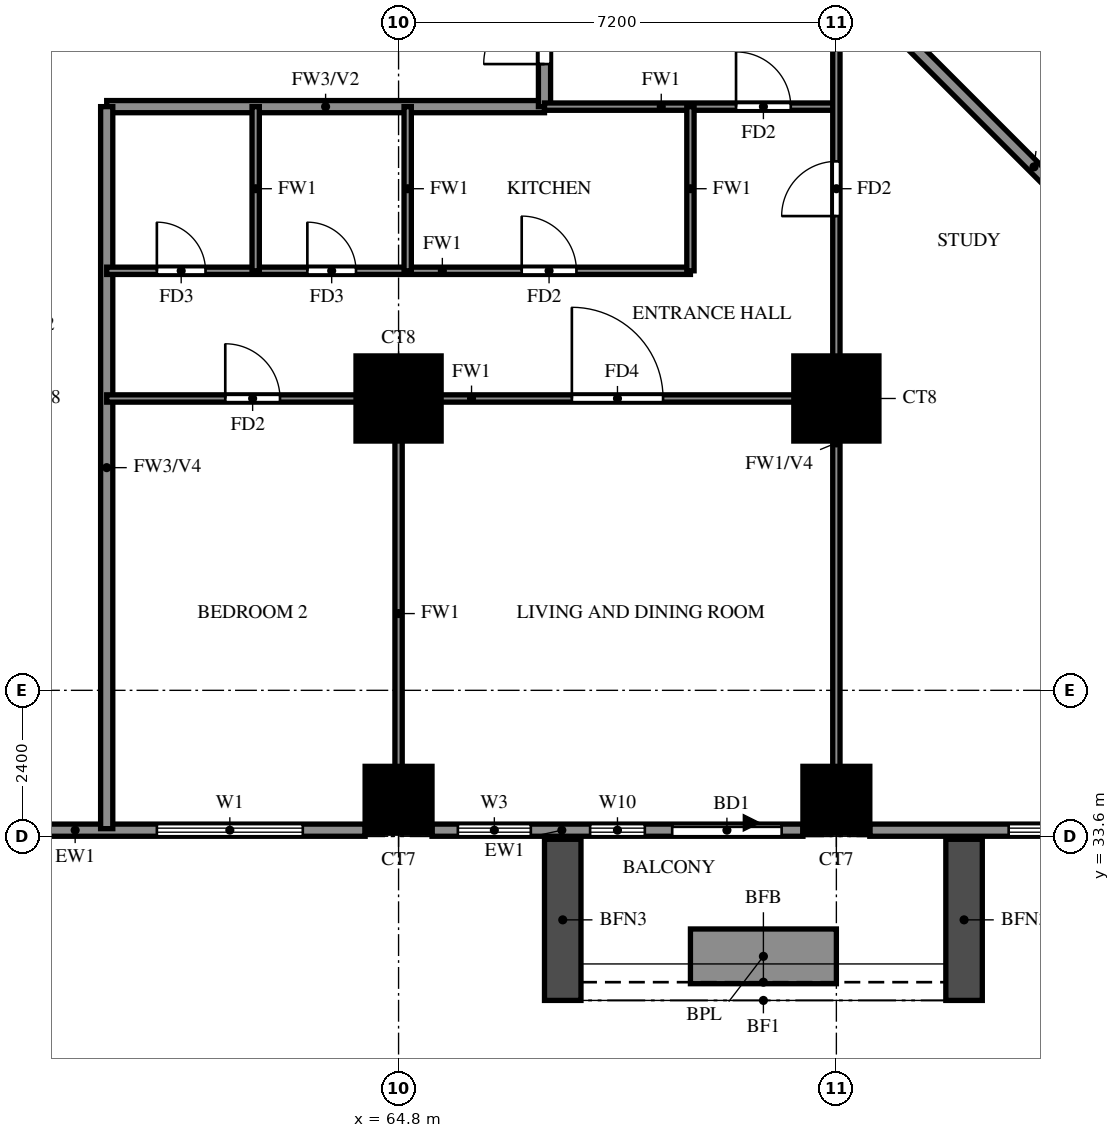
"""IFC4 building model, lengths in metres.
Left out: names, types, materials, properties, quantities, classifications, styles, units other than length and angle.
Written with IfcOpenShell. Run it as: python <this file> out.ifc"""

import sys

from ifc_helpers import new_model, si_unit, direction, frame, frame_2d, origin, origin_2d, place, context, subcontext, project, spatial, rectangle, extrude, source, transform, mapped, element, fill, save


model = new_model("IFC4")
c1 = context("Model", 3, precision=1e-05, world=origin(), true_north=direction((0.0, 1.0)))
c2 = subcontext(c1, "Body", "Model", "MODEL_VIEW")
j1 = project(units=[si_unit("LENGTHUNIT", "METRE"), si_unit("PLANEANGLEUNIT", "RADIAN")], contexts=[c1])
p1 = place(None, origin())
s1 = spatial("IfcSite", under=j1, at=p1, CompositionType="ELEMENT")
p2 = place(p1, origin())
s2 = spatial("IfcBuilding", under=s1, at=p2, CompositionType="ELEMENT")
p3 = place(p2, frame((0.0, 0.0, 48.0)))
s3 = spatial("IfcBuildingStorey", under=s2, at=p3, CompositionType="ELEMENT", Elevation=48.0)
m1 = source(origin(), c2, "Body", "SweptSolid", [
    extrude(rectangle(XDim=1.1, YDim=1.1, at=origin_2d()), origin(), (0.0, 0.0, 1.0), 3.18),
])
for number, where, z_axis, x_axis in (
    (1, (64.8, 34.2, 0.0), (0.0, 0.0, 1.0), (1.0, 0.0, 0.0)),
    (2, (72.0, 34.2, 0.0), (0.0, 0.0, 1.0), (1.0, 0.0, 0.0)),
):
    element("IfcColumn", number, at=place(p3, frame(where, z_axis=z_axis, x_axis=x_axis)), inside=s3, PredefinedType="COLUMN", context=c2, shape_type="MappedRepresentation", body=[
        mapped(m1, transform((0.0, 0.0, 0.0))),
    ])
m2 = source(origin(), c2, "Body", "SweptSolid", [
    extrude(rectangle(XDim=1.4, YDim=1.4, at=origin_2d()), origin(), (0.0, 0.0, 1.0), 3.18),
])
for number, where, z_axis, x_axis in (
    (3, (64.8, 40.8, 0.0), (0.0, 0.0, 1.0), (1.0, 0.0, 0.0)),
    (4, (72.0, 40.8, 0.0), (0.0, 0.0, 1.0), (1.0, 0.0, 0.0)),
):
    element("IfcColumn", number, at=place(p3, frame(where, z_axis=z_axis, x_axis=x_axis)), inside=s3, PredefinedType="COLUMN", context=c2, shape_type="MappedRepresentation", body=[
        mapped(m2, transform((0.0, 0.0, 0.0))),
    ])
p4 = place(p3, frame((78.74, 41.118, 0.0), z_axis=(0.0, 0.0, 1.0), x_axis=(-0.707106781187, 0.707106781187, 0.0)))
e5 = element("IfcWall", 5, at=p4, inside=s3, PredefinedType="SOLIDWALL", context=c2, shape_type="SweptSolid", body=[
    extrude(rectangle(XDim=9.874, YDim=0.2, at=frame_2d((4.937, 0.0))), origin(), (0.0, 0.0, 1.0), 3.18),
])
p5 = place(p3, frame((58.8, 33.7, 0.0), z_axis=(0.0, 0.0, 1.0), x_axis=(1.0, 0.0, 0.0)))
e6 = element("IfcWall", 6, at=p5, inside=s3, PredefinedType="SOLIDWALL", context=c2, shape_type="SweptSolid", body=[
    extrude(rectangle(XDim=5.45, YDim=0.2, at=frame_2d((2.725, 0.0))), origin(), (0.0, 0.0, 1.0), 3.18),
])
p6 = place(p5, frame((2.025, 0.0, 0.6)))
e7 = element("IfcOpeningElement", 7, at=p6, cuts=e6, PredefinedType="OPENING", context=c2, shape_type="SweptSolid", body=[
    extrude(rectangle(XDim=2.4, YDim=2.4, at=frame_2d((1.2, 1.2))), frame((0.0, 0.11, 0.0), z_axis=(0.0, -1.0, 0.0), x_axis=(1.0, 0.0, 0.0)), (0.0, 0.0, 1.0), 0.22),
])
p7 = place(p3, frame((65.35, 33.7, 0.0), z_axis=(0.0, 0.0, 1.0), x_axis=(1.0, 0.0, 0.0)))
e8 = element("IfcWall", 8, at=p7, inside=s3, PredefinedType="SOLIDWALL", context=c2, shape_type="SweptSolid", body=[
    extrude(rectangle(XDim=6.1, YDim=0.2, at=frame_2d((3.05, 0.0))), origin(), (0.0, 0.0, 1.0), 3.18),
])
p8 = place(p7, frame((3.95, 0.0, 0.0)))
e9 = element("IfcOpeningElement", 9, at=p8, cuts=e8, PredefinedType="OPENING", context=c2, shape_type="SweptSolid", body=[
    extrude(rectangle(XDim=1.8, YDim=2.4, at=frame_2d((0.9, 1.2))), frame((0.0, 0.11, 0.0), z_axis=(0.0, -1.0, 0.0), x_axis=(1.0, 0.0, 0.0)), (0.0, 0.0, 1.0), 0.22),
])
p9 = place(p7, frame((0.425, 0.0, 0.6)))
e10 = element("IfcOpeningElement", 10, at=p9, cuts=e8, PredefinedType="OPENING", context=c2, shape_type="SweptSolid", body=[
    extrude(rectangle(XDim=1.2, YDim=2.4, at=frame_2d((0.6, 1.2))), frame((0.0, 0.11, 0.0), z_axis=(0.0, -1.0, 0.0), x_axis=(1.0, 0.0, 0.0)), (0.0, 0.0, 1.0), 0.22),
])
p10 = place(p7, frame((2.6, 0.0, 0.6)))
e11 = element("IfcOpeningElement", 11, at=p10, cuts=e8, PredefinedType="OPENING", context=c2, shape_type="SweptSolid", body=[
    extrude(rectangle(XDim=0.9, YDim=2.4, at=frame_2d((0.45, 1.2))), frame((0.0, 0.11, 0.0), z_axis=(0.0, -1.0, 0.0), x_axis=(1.0, 0.0, 0.0)), (0.0, 0.0, 1.0), 0.22),
])
p11 = place(p3, frame((72.55, 33.7, 0.0), z_axis=(0.0, 0.0, 1.0), x_axis=(1.0, 0.0, 0.0)))
e12 = element("IfcWall", 12, at=p11, inside=s3, PredefinedType="SOLIDWALL", context=c2, shape_type="SweptSolid", body=[
    extrude(rectangle(XDim=13.609, YDim=0.2, at=frame_2d((6.804, 0.0))), origin(), (0.0, 0.0, 1.0), 3.18),
])
p12 = place(p11, frame((2.283, 0.0, 0.6)))
e13 = element("IfcOpeningElement", 13, at=p12, cuts=e12, PredefinedType="OPENING", context=c2, shape_type="SweptSolid", body=[
    extrude(rectangle(XDim=2.4, YDim=2.4, at=frame_2d((1.2, 1.2))), frame((0.0, 0.11, 0.0), z_axis=(0.0, -1.0, 0.0), x_axis=(1.0, 0.0, 0.0)), (0.0, 0.0, 1.0), 0.22),
])
p13 = place(p11, frame((5.017, 0.0, 0.6)))
e14 = element("IfcOpeningElement", 14, at=p13, cuts=e12, PredefinedType="OPENING", context=c2, shape_type="SweptSolid", body=[
    extrude(rectangle(XDim=2.4, YDim=2.4, at=frame_2d((1.2, 1.2))), frame((0.0, 0.11, 0.0), z_axis=(0.0, -1.0, 0.0), x_axis=(1.0, 0.0, 0.0)), (0.0, 0.0, 1.0), 0.22),
])
p14 = place(p11, frame((9.429, 0.0, 0.6)))
e15 = element("IfcOpeningElement", 15, at=p14, cuts=e12, PredefinedType="OPENING", context=c2, shape_type="SweptSolid", body=[
    extrude(rectangle(XDim=2.4, YDim=2.4, at=frame_2d((1.2, 1.2))), frame((0.0, 0.11, 0.0), z_axis=(0.0, -1.0, 0.0), x_axis=(1.0, 0.0, 0.0)), (0.0, 0.0, 1.0), 0.22),
])
for number, where, z_axis, x_axis in (
    (16, (67.5, 33.55, 0.0), (0.0, 0.0, 1.0), (0.0, -1.0, 0.0)),
    (17, (74.1, 33.55, 0.0), (0.0, 0.0, 1.0), (0.0, -1.0, 0.0)),
):
    element("IfcWall", number, at=place(p3, frame(where, z_axis=z_axis, x_axis=x_axis)), inside=s3, PredefinedType="SOLIDWALL", context=c2, shape_type="SweptSolid", body=[
        extrude(rectangle(XDim=2.65, YDim=0.6, at=frame_2d((1.325, 0.0))), origin(), (0.0, 0.0, 1.0), 2.85),
    ])
p15 = place(p3, frame((69.6, 31.625, 0.0), z_axis=(0.0, 0.0, 1.0), x_axis=(1.0, 0.0, 0.0)))
e18 = element("IfcWall", 18, at=p15, inside=s3, PredefinedType="SOLIDWALL", context=c2, shape_type="SweptSolid", body=[
    extrude(rectangle(XDim=2.4, YDim=0.9, at=frame_2d((1.2, 0.0))), origin(), (0.0, 0.0, 1.0), 0.9),
])
p16 = place(p3, frame((60.0, 45.6, 0.0), z_axis=(0.0, 0.0, 1.0), x_axis=(1.0, 0.0, 0.0)))
e19 = element("IfcWall", 19, at=p16, inside=s3, PredefinedType="SOLIDWALL", context=c2, shape_type="SweptSolid", body=[
    extrude(rectangle(XDim=7.2, YDim=0.2, at=frame_2d((3.6, 0.0))), origin(), (0.0, 0.0, 1.0), 3.18),
])
p17 = place(p3, frame((60.0, 33.725, 0.0), z_axis=(0.0, 0.0, 1.0), x_axis=(0.0, 1.0, 0.0)))
e20 = element("IfcWall", 20, at=p17, inside=s3, PredefinedType="SOLIDWALL", context=c2, shape_type="SweptSolid", body=[
    extrude(rectangle(XDim=11.875, YDim=0.2, at=frame_2d((5.938, 0.0))), origin(), (0.0, 0.0, 1.0), 2.28),
])
p18 = place(p3, frame((67.2, 45.6, 0.0), z_axis=(0.0, 0.0, 1.0), x_axis=(0.0, 1.0, 0.0)))
e21 = element("IfcWall", 21, at=p18, inside=s3, PredefinedType="SOLIDWALL", context=c2, shape_type="SweptSolid", body=[
    extrude(rectangle(XDim=12.0, YDim=0.2, at=frame_2d((6.0, 0.0))), origin(), (0.0, 0.0, 1.0), 3.18),
])
p19 = place(p18, frame((10.3, 0.0, 0.0)))
e22 = element("IfcOpeningElement", 22, at=p19, cuts=e21, PredefinedType="OPENING", context=c2, shape_type="SweptSolid", body=[
    extrude(rectangle(XDim=1.0, YDim=2.1, at=frame_2d((0.5, 1.05))), frame((0.0, 0.11, 0.0), z_axis=(0.0, -1.0, 0.0), x_axis=(1.0, 0.0, 0.0)), (0.0, 0.0, 1.0), 0.22),
])
p20 = place(p18, frame((0.7, 0.0, 0.0)))
e23 = element("IfcOpeningElement", 23, at=p20, cuts=e21, PredefinedType="OPENING", context=c2, shape_type="SweptSolid", body=[
    extrude(rectangle(XDim=1.0, YDim=2.1, at=frame_2d((0.5, 1.05))), frame((0.0, 0.11, 0.0), z_axis=(0.0, -1.0, 0.0), x_axis=(1.0, 0.0, 0.0)), (0.0, 0.0, 1.0), 0.22),
])
p21 = place(p3, frame((60.0, 40.8, 0.0), z_axis=(0.0, 0.0, 1.0), x_axis=(1.0, 0.0, 0.0)))
e24 = element("IfcWall", 24, at=p21, inside=s3, PredefinedType="PARTITIONING", context=c2, shape_type="SweptSolid", body=[
    extrude(rectangle(XDim=12.0, YDim=0.12, at=frame_2d((6.0, 0.0))), origin(), (0.0, 0.0, 1.0), 3.18),
])
p22 = place(p21, frame((7.65, 0.0, 0.0)))
e25 = element("IfcOpeningElement", 25, at=p22, cuts=e24, PredefinedType="OPENING", context=c2, shape_type="SweptSolid", body=[
    extrude(rectangle(XDim=1.5, YDim=2.1, at=frame_2d((0.75, 1.05))), frame((0.0, 0.07, 0.0), z_axis=(0.0, -1.0, 0.0), x_axis=(1.0, 0.0, 0.0)), (0.0, 0.0, 1.0), 0.14),
])
p23 = place(p21, frame((1.95, 0.0, 0.0)))
e26 = element("IfcOpeningElement", 26, at=p23, cuts=e24, PredefinedType="OPENING", context=c2, shape_type="SweptSolid", body=[
    extrude(rectangle(XDim=0.9, YDim=2.1, at=frame_2d((0.45, 1.05))), frame((0.0, 0.07, 0.0), z_axis=(0.0, -1.0, 0.0), x_axis=(1.0, 0.0, 0.0)), (0.0, 0.0, 1.0), 0.14),
])
p24 = place(p3, frame((60.0, 42.9, 0.0), z_axis=(0.0, 0.0, 1.0), x_axis=(1.0, 0.0, 0.0)))
e27 = element("IfcWall", 27, at=p24, inside=s3, PredefinedType="PARTITIONING", context=c2, shape_type="SweptSolid", body=[
    extrude(rectangle(XDim=9.6, YDim=0.12, at=frame_2d((4.8, 0.0))), origin(), (0.0, 0.0, 1.0), 3.18),
])
p25 = place(p24, frame((6.825, 0.0, 0.0)))
e28 = element("IfcOpeningElement", 28, at=p25, cuts=e27, PredefinedType="OPENING", context=c2, shape_type="SweptSolid", body=[
    extrude(rectangle(XDim=0.9, YDim=2.1, at=frame_2d((0.45, 1.05))), frame((0.0, 0.07, 0.0), z_axis=(0.0, -1.0, 0.0), x_axis=(1.0, 0.0, 0.0)), (0.0, 0.0, 1.0), 0.14),
])
p26 = place(p24, frame((3.3, 0.0, 0.0)))
e29 = element("IfcOpeningElement", 29, at=p26, cuts=e27, PredefinedType="OPENING", context=c2, shape_type="SweptSolid", body=[
    extrude(rectangle(XDim=0.8, YDim=2.1, at=frame_2d((0.4, 1.05))), frame((0.0, 0.07, 0.0), z_axis=(0.0, -1.0, 0.0), x_axis=(1.0, 0.0, 0.0)), (0.0, 0.0, 1.0), 0.14),
])
p27 = place(p24, frame((0.825, 0.0, 0.0)))
e30 = element("IfcOpeningElement", 30, at=p27, cuts=e27, PredefinedType="OPENING", context=c2, shape_type="SweptSolid", body=[
    extrude(rectangle(XDim=0.8, YDim=2.1, at=frame_2d((0.4, 1.05))), frame((0.0, 0.07, 0.0), z_axis=(0.0, -1.0, 0.0), x_axis=(1.0, 0.0, 0.0)), (0.0, 0.0, 1.0), 0.14),
])
p28 = place(p3, frame((67.2, 45.6, 0.0), z_axis=(0.0, 0.0, 1.0), x_axis=(1.0, 0.0, 0.0)))
e31 = element("IfcWall", 31, at=p28, inside=s3, PredefinedType="PARTITIONING", context=c2, shape_type="SweptSolid", body=[
    extrude(rectangle(XDim=4.8, YDim=0.12, at=frame_2d((2.4, 0.0))), origin(), (0.0, 0.0, 1.0), 3.18),
])
p29 = place(p28, frame((3.15, 0.0, 0.0)))
e32 = element("IfcOpeningElement", 32, at=p29, cuts=e31, PredefinedType="OPENING", context=c2, shape_type="SweptSolid", body=[
    extrude(rectangle(XDim=0.9, YDim=2.1, at=frame_2d((0.45, 1.05))), frame((0.0, 0.07, 0.0), z_axis=(0.0, -1.0, 0.0), x_axis=(1.0, 0.0, 0.0)), (0.0, 0.0, 1.0), 0.14),
])
p30 = place(p3, frame((62.45, 42.9, 0.0), z_axis=(0.0, 0.0, 1.0), x_axis=(0.0, 1.0, 0.0)))
e33 = element("IfcWall", 33, at=p30, inside=s3, PredefinedType="PARTITIONING", context=c2, shape_type="SweptSolid", body=[
    extrude(rectangle(XDim=2.7, YDim=0.12, at=frame_2d((1.35, 0.0))), origin(), (0.0, 0.0, 1.0), 3.18),
])
p31 = place(p3, frame((64.8, 33.725, 0.0), z_axis=(0.0, 0.0, 1.0), x_axis=(0.0, 1.0, 0.0)))
e34 = element("IfcWall", 34, at=p31, inside=s3, PredefinedType="PARTITIONING", context=c2, shape_type="SweptSolid", body=[
    extrude(rectangle(XDim=7.075, YDim=0.12, at=frame_2d((3.538, 0.0))), origin(), (0.0, 0.0, 1.0), 3.18),
])
for number, where, z_axis, x_axis in (
    (35, (64.95, 42.9, 0.0), (0.0, 0.0, 1.0), (0.0, 1.0, 0.0)),
    (36, (69.6, 42.9, 0.0), (0.0, 0.0, 1.0), (0.0, 1.0, 0.0)),
):
    element("IfcWall", number, at=place(p3, frame(where, z_axis=z_axis, x_axis=x_axis)), inside=s3, PredefinedType="PARTITIONING", context=c2, shape_type="SweptSolid", body=[
        extrude(rectangle(XDim=2.7, YDim=0.12, at=frame_2d((1.35, 0.0))), origin(), (0.0, 0.0, 1.0), 3.18),
    ])
p32 = place(p3, frame((72.0, 33.725, 0.0), z_axis=(0.0, 0.0, 1.0), x_axis=(0.0, 1.0, 0.0)))
e37 = element("IfcWall", 37, at=p32, inside=s3, PredefinedType="PARTITIONING", context=c2, shape_type="SweptSolid", body=[
    extrude(rectangle(XDim=14.098, YDim=0.12, at=frame_2d((7.049, 0.0))), origin(), (0.0, 0.0, 1.0), 2.28),
])
p33 = place(p32, frame((10.075, 0.0, 0.0)))
e38 = element("IfcOpeningElement", 38, at=p33, cuts=e37, PredefinedType="OPENING", context=c2, shape_type="SweptSolid", body=[
    extrude(rectangle(XDim=0.9, YDim=2.1, at=frame_2d((0.45, 1.05))), frame((0.0, 0.07, 0.0), z_axis=(0.0, -1.0, 0.0), x_axis=(1.0, 0.0, 0.0)), (0.0, 0.0, 1.0), 0.14),
])
p34 = place(p6, origin())
e39 = element("IfcWindow", 39, at=p34, inside=s3, PartitioningType="DOUBLE_PANEL_VERTICAL", PredefinedType="WINDOW", context=c2, shape_type="SweptSolid", body=[
    extrude(rectangle(XDim=2.4, YDim=2.4, at=frame_2d((1.2, 1.2))), frame((0.0, 0.03, 0.0), z_axis=(0.0, -1.0, 0.0), x_axis=(1.0, 0.0, 0.0)), (0.0, 0.0, 1.0), 0.06),
])
fill(e7, e39)
p35 = place(p8, origin())
e40 = element("IfcDoor", 40, at=p35, inside=s3, OperationType="DOUBLE_DOOR_SLIDING", PredefinedType="DOOR", context=c2, shape_type="SweptSolid", body=[
    extrude(rectangle(XDim=1.8, YDim=2.4, at=frame_2d((0.9, 1.2))), frame((0.0, 0.025, 0.0), z_axis=(0.0, -1.0, 0.0), x_axis=(1.0, 0.0, 0.0)), (0.0, 0.0, 1.0), 0.05),
])
fill(e9, e40)
p36 = place(p9, origin())
e41 = element("IfcWindow", 41, at=p36, inside=s3, PartitioningType="SINGLE_PANEL", PredefinedType="WINDOW", context=c2, shape_type="SweptSolid", body=[
    extrude(rectangle(XDim=1.2, YDim=2.4, at=frame_2d((0.6, 1.2))), frame((0.0, 0.03, 0.0), z_axis=(0.0, -1.0, 0.0), x_axis=(1.0, 0.0, 0.0)), (0.0, 0.0, 1.0), 0.06),
])
fill(e10, e41)
p37 = place(p10, origin())
e42 = element("IfcWindow", 42, at=p37, inside=s3, PartitioningType="SINGLE_PANEL", PredefinedType="WINDOW", context=c2, shape_type="SweptSolid", body=[
    extrude(rectangle(XDim=0.9, YDim=2.4, at=frame_2d((0.45, 1.2))), frame((0.0, 0.03, 0.0), z_axis=(0.0, -1.0, 0.0), x_axis=(1.0, 0.0, 0.0)), (0.0, 0.0, 1.0), 0.06),
])
fill(e11, e42)
p38 = place(p12, origin())
e43 = element("IfcWindow", 43, at=p38, inside=s3, PartitioningType="DOUBLE_PANEL_VERTICAL", PredefinedType="WINDOW", context=c2, shape_type="SweptSolid", body=[
    extrude(rectangle(XDim=2.4, YDim=2.4, at=frame_2d((1.2, 1.2))), frame((0.0, 0.03, 0.0), z_axis=(0.0, -1.0, 0.0), x_axis=(1.0, 0.0, 0.0)), (0.0, 0.0, 1.0), 0.06),
])
fill(e13, e43)
p39 = place(p29, origin())
e44 = element("IfcDoor", 44, at=p39, inside=s3, OperationType="SINGLE_SWING_LEFT", PredefinedType="DOOR", context=c2, shape_type="SweptSolid", body=[
    extrude(rectangle(XDim=0.9, YDim=2.1, at=frame_2d((0.45, 1.05))), frame((0.0, 0.025, 0.0), z_axis=(0.0, -1.0, 0.0), x_axis=(1.0, 0.0, 0.0)), (0.0, 0.0, 1.0), 0.05),
])
fill(e32, e44)
p40 = place(p20, origin())
e45 = element("IfcDoor", 45, at=p40, inside=s3, OperationType="SINGLE_SWING_LEFT", PredefinedType="DOOR", context=c2, shape_type="SweptSolid", body=[
    extrude(rectangle(XDim=1.0, YDim=2.1, at=frame_2d((0.5, 1.05))), frame((0.0, 0.025, 0.0), z_axis=(0.0, -1.0, 0.0), x_axis=(1.0, 0.0, 0.0)), (0.0, 0.0, 1.0), 0.05),
])
fill(e23, e45)
p41 = place(p22, origin())
e46 = element("IfcDoor", 46, at=p41, inside=s3, OperationType="SINGLE_SWING_RIGHT", PredefinedType="DOOR", context=c2, shape_type="SweptSolid", body=[
    extrude(rectangle(XDim=1.5, YDim=2.1, at=frame_2d((0.75, 1.05))), frame((0.0, 0.025, 0.0), z_axis=(0.0, -1.0, 0.0), x_axis=(1.0, 0.0, 0.0)), (0.0, 0.0, 1.0), 0.05),
])
fill(e25, e46)
p42 = place(p23, origin())
e47 = element("IfcDoor", 47, at=p42, inside=s3, OperationType="SINGLE_SWING_LEFT", PredefinedType="DOOR", context=c2, shape_type="SweptSolid", body=[
    extrude(rectangle(XDim=0.9, YDim=2.1, at=frame_2d((0.45, 1.05))), frame((0.0, 0.025, 0.0), z_axis=(0.0, -1.0, 0.0), x_axis=(1.0, 0.0, 0.0)), (0.0, 0.0, 1.0), 0.05),
])
fill(e26, e47)
p43 = place(p25, origin())
e48 = element("IfcDoor", 48, at=p43, inside=s3, OperationType="SINGLE_SWING_LEFT", PredefinedType="DOOR", context=c2, shape_type="SweptSolid", body=[
    extrude(rectangle(XDim=0.9, YDim=2.1, at=frame_2d((0.45, 1.05))), frame((0.0, 0.025, 0.0), z_axis=(0.0, -1.0, 0.0), x_axis=(1.0, 0.0, 0.0)), (0.0, 0.0, 1.0), 0.05),
])
fill(e28, e48)
p44 = place(p26, origin())
e49 = element("IfcDoor", 49, at=p44, inside=s3, OperationType="SINGLE_SWING_RIGHT", PredefinedType="DOOR", context=c2, shape_type="SweptSolid", body=[
    extrude(rectangle(XDim=0.8, YDim=2.1, at=frame_2d((0.4, 1.05))), frame((0.0, 0.025, 0.0), z_axis=(0.0, -1.0, 0.0), x_axis=(1.0, 0.0, 0.0)), (0.0, 0.0, 1.0), 0.05),
])
fill(e29, e49)
p45 = place(p27, origin())
e50 = element("IfcDoor", 50, at=p45, inside=s3, OperationType="SINGLE_SWING_LEFT", PredefinedType="DOOR", context=c2, shape_type="SweptSolid", body=[
    extrude(rectangle(XDim=0.8, YDim=2.1, at=frame_2d((0.4, 1.05))), frame((0.0, 0.025, 0.0), z_axis=(0.0, -1.0, 0.0), x_axis=(1.0, 0.0, 0.0)), (0.0, 0.0, 1.0), 0.05),
])
fill(e30, e50)
p46 = place(p33, origin())
e51 = element("IfcDoor", 51, at=p46, inside=s3, OperationType="SINGLE_SWING_LEFT", PredefinedType="DOOR", context=c2, shape_type="SweptSolid", body=[
    extrude(rectangle(XDim=0.9, YDim=2.1, at=frame_2d((0.45, 1.05))), frame((0.0, 0.025, 0.0), z_axis=(0.0, -1.0, 0.0), x_axis=(1.0, 0.0, 0.0)), (0.0, 0.0, 1.0), 0.05),
])
fill(e38, e51)
save(model, sys.argv[1])
